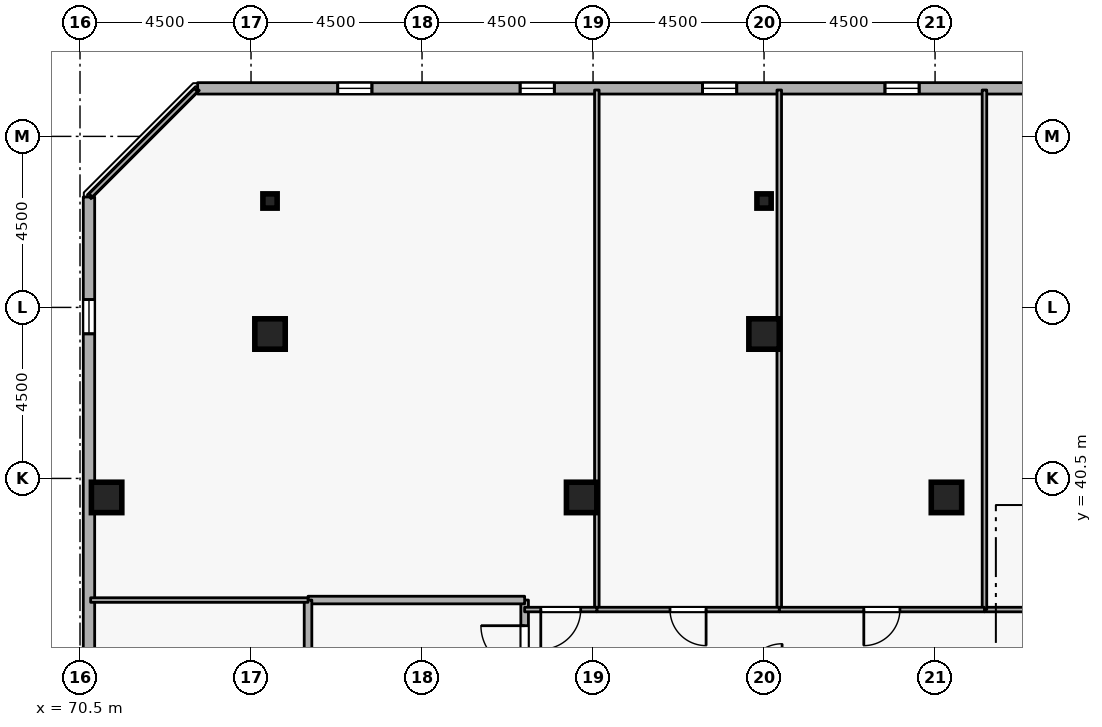
"""IFC4 building model, lengths in metres.
Left out: names, types, materials, properties, quantities, classifications, styles, units other than length and angle.
Written with IfcOpenShell. Run it as: python <this file> out.ifc"""

import sys

from ifc_helpers import new_model, si_unit, direction, frame, frame_2d, origin, origin_2d, place, context, subcontext, project, spatial, rectangle, i_section, extrude, element, fill, save


model = new_model("IFC4")
c1 = context("Model", 3, precision=1e-05, world=origin(), true_north=direction((0.0, 1.0)))
c2 = subcontext(c1, "Body", "Model", "MODEL_VIEW")
j1 = project(units=[si_unit("LENGTHUNIT", "METRE"), si_unit("PLANEANGLEUNIT", "RADIAN")], contexts=[c1])
p1 = place(None, origin())
s1 = spatial("IfcSite", under=j1, at=p1, CompositionType="ELEMENT")
p2 = place(p1, origin())
s2 = spatial("IfcBuilding", under=s1, at=p2, CompositionType="ELEMENT")
p3 = place(p2, frame((0.0, 0.0, 272.7)))
s3 = spatial("IfcBuildingStorey", under=s2, at=p3, CompositionType="ELEMENT", Elevation=272.7)
for number, where, z_axis, x_axis in (
    (1, (88.5, 44.3, 0.0), (0.0, 0.0, 1.0), (1.0, 0.0, 0.0)),
    (2, (75.5, 44.3, 0.0), (0.0, 0.0, 1.0), (1.0, 0.0, 0.0)),
    (3, (71.2, 40.0, 0.0), (0.0, 0.0, 1.0), (1.0, 0.0, 0.0)),
    (4, (93.3, 40.0, 0.0), (0.0, 0.0, 1.0), (1.0, 0.0, 0.0)),
    (5, (83.7, 40.0, 0.0), (0.0, 0.0, 1.0), (1.0, 0.0, 0.0)),
):
    element("IfcColumn", number, at=place(p3, frame(where, z_axis=z_axis, x_axis=x_axis)), inside=s3, PredefinedType="COLUMN", context=c2, shape_type="SweptSolid", body=[
        extrude(rectangle(XDim=0.8, YDim=0.8, at=origin_2d()), origin(), (0.0, 0.0, 1.0), 3.6),
    ])
for number, where, z_axis, x_axis in (
    (6, (88.5, 47.8, 0.0), (0.0, 0.0, 1.0), (1.0, 0.0, 0.0)),
    (7, (75.5, 47.8, 0.0), (0.0, 0.0, 1.0), (1.0, 0.0, 0.0)),
):
    element("IfcColumn", number, at=place(p3, frame(where, z_axis=z_axis, x_axis=x_axis)), inside=s3, PredefinedType="COLUMN", context=c2, shape_type="SweptSolid", body=[
        extrude(i_section(OverallWidth=0.375, OverallDepth=0.375, WebThickness=0.017, FlangeThickness=0.027, FilletRadius=0.015, at=origin_2d()), origin(), (0.0, 0.0, 1.0), 3.6),
    ])
p4 = place(p3, frame((109.681, 50.765, 0.0), z_axis=(0.0, 0.0, 1.0), x_axis=(-0.999999999634, -2.7061402e-05, 0.0)))
e8 = element("IfcWall", 8, at=p4, inside=s3, PredefinedType="STANDARD", context=c2, shape_type="SweptSolid", body=[
    extrude(rectangle(XDim=36.087, YDim=0.3, at=frame_2d((18.043, 0.0))), origin(), (0.0, 0.0, 1.0), 2.7),
])
p5 = place(p4, frame((2.7, 0.0, 0.72)))
e9 = element("IfcOpeningElement", 9, at=p5, cuts=e8, PredefinedType="OPENING", context=c2, shape_type="SweptSolid", body=[
    extrude(rectangle(XDim=0.9, YDim=1.75, at=frame_2d((0.45, 0.875))), frame((0.0, 0.16, 0.0), z_axis=(0.0, -1.0, 0.0), x_axis=(1.0, 0.0, 0.0)), (0.0, 0.0, 1.0), 0.32),
])
p6 = place(p4, frame((7.5, 0.0, 0.72)))
e10 = element("IfcOpeningElement", 10, at=p6, cuts=e8, PredefinedType="OPENING", context=c2, shape_type="SweptSolid", body=[
    extrude(rectangle(XDim=0.9, YDim=1.75, at=frame_2d((0.45, 0.875))), frame((0.0, 0.16, 0.0), z_axis=(0.0, -1.0, 0.0), x_axis=(1.0, 0.0, 0.0)), (0.0, 0.0, 1.0), 0.32),
])
p7 = place(p4, frame((12.3, 0.0, 0.72)))
e11 = element("IfcOpeningElement", 11, at=p7, cuts=e8, PredefinedType="OPENING", context=c2, shape_type="SweptSolid", body=[
    extrude(rectangle(XDim=0.9, YDim=1.75, at=frame_2d((0.45, 0.875))), frame((0.0, 0.16, 0.0), z_axis=(0.0, -1.0, 0.0), x_axis=(1.0, 0.0, 0.0)), (0.0, 0.0, 1.0), 0.32),
])
p8 = place(p4, frame((17.1, 0.0, 0.72)))
e12 = element("IfcOpeningElement", 12, at=p8, cuts=e8, PredefinedType="OPENING", context=c2, shape_type="SweptSolid", body=[
    extrude(rectangle(XDim=0.9, YDim=1.75, at=frame_2d((0.45, 0.875))), frame((0.0, 0.16, 0.0), z_axis=(0.0, -1.0, 0.0), x_axis=(1.0, 0.0, 0.0)), (0.0, 0.0, 1.0), 0.32),
])
p9 = place(p4, frame((21.9, 0.0, 0.72)))
e13 = element("IfcOpeningElement", 13, at=p9, cuts=e8, PredefinedType="OPENING", context=c2, shape_type="SweptSolid", body=[
    extrude(rectangle(XDim=0.9, YDim=1.75, at=frame_2d((0.45, 0.875))), frame((0.0, 0.16, 0.0), z_axis=(0.0, -1.0, 0.0), x_axis=(1.0, 0.0, 0.0)), (0.0, 0.0, 1.0), 0.32),
])
p10 = place(p4, frame((26.7, 0.0, 0.72)))
e14 = element("IfcOpeningElement", 14, at=p10, cuts=e8, PredefinedType="OPENING", context=c2, shape_type="SweptSolid", body=[
    extrude(rectangle(XDim=0.9, YDim=1.75, at=frame_2d((0.45, 0.875))), frame((0.0, 0.16, 0.0), z_axis=(0.0, -1.0, 0.0), x_axis=(1.0, 0.0, 0.0)), (0.0, 0.0, 1.0), 0.32),
])
p11 = place(p4, frame((31.5, 0.0, 0.72)))
e15 = element("IfcOpeningElement", 15, at=p11, cuts=e8, PredefinedType="OPENING", context=c2, shape_type="SweptSolid", body=[
    extrude(rectangle(XDim=0.9, YDim=1.75, at=frame_2d((0.45, 0.875))), frame((0.0, 0.16, 0.0), z_axis=(0.0, -1.0, 0.0), x_axis=(1.0, 0.0, 0.0)), (0.0, 0.0, 1.0), 0.32),
])
p12 = place(p3, frame((70.736, 47.906, 0.0), z_axis=(0.0, 0.0, 1.0), x_axis=(-2.7061402e-05, -0.999999999634, 0.0)))
e16 = element("IfcWall", 16, at=p12, inside=s3, PredefinedType="STANDARD", context=c2, shape_type="SweptSolid", body=[
    extrude(rectangle(XDim=36.087, YDim=0.3, at=frame_2d((18.043, 0.0))), origin(), (0.0, 0.0, 1.0), 2.7),
])
p13 = place(p12, frame((2.7, 0.0, 0.72)))
e17 = element("IfcOpeningElement", 17, at=p13, cuts=e16, PredefinedType="OPENING", context=c2, shape_type="SweptSolid", body=[
    extrude(rectangle(XDim=0.9, YDim=1.75, at=frame_2d((0.45, 0.875))), frame((0.0, 0.16, 0.0), z_axis=(0.0, -1.0, 0.0), x_axis=(1.0, 0.0, 0.0)), (0.0, 0.0, 1.0), 0.32),
])
p14 = place(p12, frame((12.3, 0.0, 0.72)))
e18 = element("IfcOpeningElement", 18, at=p14, cuts=e16, PredefinedType="OPENING", context=c2, shape_type="SweptSolid", body=[
    extrude(rectangle(XDim=0.9, YDim=1.75, at=frame_2d((0.45, 0.875))), frame((0.0, 0.16, 0.0), z_axis=(0.0, -1.0, 0.0), x_axis=(1.0, 0.0, 0.0)), (0.0, 0.0, 1.0), 0.32),
])
p15 = place(p12, frame((17.1, 0.0, 0.72)))
e19 = element("IfcOpeningElement", 19, at=p15, cuts=e16, PredefinedType="OPENING", context=c2, shape_type="SweptSolid", body=[
    extrude(rectangle(XDim=0.9, YDim=1.75, at=frame_2d((0.45, 0.875))), frame((0.0, 0.16, 0.0), z_axis=(0.0, -1.0, 0.0), x_axis=(1.0, 0.0, 0.0)), (0.0, 0.0, 1.0), 0.32),
])
p16 = place(p12, frame((26.7, 0.0, 0.72)))
e20 = element("IfcOpeningElement", 20, at=p16, cuts=e16, PredefinedType="OPENING", context=c2, shape_type="SweptSolid", body=[
    extrude(rectangle(XDim=0.9, YDim=1.75, at=frame_2d((0.45, 0.875))), frame((0.0, 0.16, 0.0), z_axis=(0.0, -1.0, 0.0), x_axis=(1.0, 0.0, 0.0)), (0.0, 0.0, 1.0), 0.32),
])
p17 = place(p12, frame((31.5, 0.0, 0.72)))
e21 = element("IfcOpeningElement", 21, at=p17, cuts=e16, PredefinedType="OPENING", context=c2, shape_type="SweptSolid", body=[
    extrude(rectangle(XDim=0.9, YDim=1.75, at=frame_2d((0.45, 0.875))), frame((0.0, 0.16, 0.0), z_axis=(0.0, -1.0, 0.0), x_axis=(1.0, 0.0, 0.0)), (0.0, 0.0, 1.0), 0.32),
])
p18 = place(p3, frame((82.2, 34.8, 0.0), z_axis=(0.0, 0.0, 1.0), x_axis=(0.0, 1.0, 0.0)))
e22 = element("IfcWall", 22, at=p18, inside=s3, PredefinedType="STANDARD", context=c2, shape_type="SweptSolid", body=[
    extrude(rectangle(XDim=2.5, YDim=0.2, at=frame_2d((1.25, 0.0))), origin(), (0.0, 0.0, 1.0), 3.34),
])
p19 = place(p18, frame((0.675, 0.0, 0.0)))
e23 = element("IfcOpeningElement", 23, at=p19, cuts=e22, PredefinedType="OPENING", context=c2, shape_type="SweptSolid", body=[
    extrude(rectangle(XDim=1.15, YDim=2.1, at=frame_2d((0.575, 1.05))), frame((0.0, 0.11, 0.0), z_axis=(0.0, -1.0, 0.0), x_axis=(1.0, 0.0, 0.0)), (0.0, 0.0, 1.0), 0.22),
])
p20 = place(p3, frame((82.2, 37.3, 0.0), z_axis=(0.0, 0.0, 1.0), x_axis=(-1.0, 0.0, 0.0)))
e24 = element("IfcWall", 24, at=p20, inside=s3, PredefinedType="STANDARD", context=c2, shape_type="SweptSolid", body=[
    extrude(rectangle(XDim=5.7, YDim=0.2, at=frame_2d((2.85, 0.0))), origin(), (0.0, 0.0, 1.0), 3.34),
])
p21 = place(p3, frame((76.5, 37.3, 0.0), z_axis=(0.0, 0.0, 1.0), x_axis=(0.0, -1.0, 0.0)))
e25 = element("IfcWall", 25, at=p21, inside=s3, PredefinedType="STANDARD", context=c2, shape_type="SweptSolid", body=[
    extrude(rectangle(XDim=2.5, YDim=0.2, at=frame_2d((1.25, 0.0))), origin(), (0.0, 0.0, 1.0), 3.34),
])
p22 = place(p3, frame((100.7, 37.05, 0.0), z_axis=(0.0, 0.0, 1.0), x_axis=(-1.0, 0.0, 0.0)))
e26 = element("IfcWall", 26, at=p22, inside=s3, PredefinedType="PARTITIONING", context=c2, shape_type="SweptSolid", body=[
    extrude(rectangle(XDim=6.4, YDim=0.12, at=frame_2d((3.2, 0.0))), origin(), (0.0, 0.0, 1.0), 3.34),
])
p23 = place(p22, frame((2.675, 0.0, 0.0)))
e27 = element("IfcOpeningElement", 27, at=p23, cuts=e26, PredefinedType="OPENING", context=c2, shape_type="SweptSolid", body=[
    extrude(rectangle(XDim=1.05, YDim=2.1, at=frame_2d((0.525, 1.05))), frame((0.0, 0.07, 0.0), z_axis=(0.0, -1.0, 0.0), x_axis=(1.0, 0.0, 0.0)), (0.0, 0.0, 1.0), 0.14),
])
for number, where, z_axis, x_axis in (
    (28, (94.3, 37.05, 0.0), (0.0, 0.0, 1.0), (0.0, 1.0, 0.0)),
    (29, (88.9, 37.05, 0.0), (0.0, 0.0, 1.0), (0.0, 1.0, 0.0)),
):
    element("IfcWall", number, at=place(p3, frame(where, z_axis=z_axis, x_axis=x_axis)), inside=s3, PredefinedType="PARTITIONING", context=c2, shape_type="SweptSolid", body=[
        extrude(rectangle(XDim=13.67, YDim=0.12, at=frame_2d((6.835, 0.0))), origin(), (0.0, 0.0, 1.0), 3.34),
    ])
p24 = place(p3, frame((94.3, 37.05, 0.0), z_axis=(0.0, 0.0, 1.0), x_axis=(-1.0, 0.0, 0.0)))
e30 = element("IfcWall", 30, at=p24, inside=s3, PredefinedType="PARTITIONING", context=c2, shape_type="SweptSolid", body=[
    extrude(rectangle(XDim=5.4, YDim=0.12, at=frame_2d((2.7, 0.0))), origin(), (0.0, 0.0, 1.0), 3.34),
])
p25 = place(p24, frame((2.225, 0.0, 0.0)))
e31 = element("IfcOpeningElement", 31, at=p25, cuts=e30, PredefinedType="OPENING", context=c2, shape_type="SweptSolid", body=[
    extrude(rectangle(XDim=0.95, YDim=2.1, at=frame_2d((0.475, 1.05))), frame((0.0, 0.07, 0.0), z_axis=(0.0, -1.0, 0.0), x_axis=(1.0, 0.0, 0.0)), (0.0, 0.0, 1.0), 0.14),
])
p26 = place(p3, frame((84.1, 37.05, 0.0), z_axis=(0.0, 0.0, 1.0), x_axis=(0.0, 1.0, 0.0)))
e32 = element("IfcWall", 32, at=p26, inside=s3, PredefinedType="PARTITIONING", context=c2, shape_type="SweptSolid", body=[
    extrude(rectangle(XDim=13.67, YDim=0.12, at=frame_2d((6.835, 0.0))), origin(), (0.0, 0.0, 1.0), 3.34),
])
p27 = place(p3, frame((88.9, 37.05, 0.0), z_axis=(0.0, 0.0, 1.0), x_axis=(-1.0, 0.0, 0.0)))
e33 = element("IfcWall", 33, at=p27, inside=s3, PredefinedType="PARTITIONING", context=c2, shape_type="SweptSolid", body=[
    extrude(rectangle(XDim=4.8, YDim=0.12, at=frame_2d((2.4, 0.0))), origin(), (0.0, 0.0, 1.0), 3.34),
])
p28 = place(p27, frame((1.925, 0.0, 0.0)))
e34 = element("IfcOpeningElement", 34, at=p28, cuts=e33, PredefinedType="OPENING", context=c2, shape_type="SweptSolid", body=[
    extrude(rectangle(XDim=0.95, YDim=2.1, at=frame_2d((0.475, 1.05))), frame((0.0, 0.07, 0.0), z_axis=(0.0, -1.0, 0.0), x_axis=(1.0, 0.0, 0.0)), (0.0, 0.0, 1.0), 0.14),
])
p29 = place(p3, frame((76.5, 37.3, 0.0), z_axis=(0.0, 0.0, 1.0), x_axis=(-1.0, 0.0, 0.0)))
e35 = element("IfcWall", 35, at=p29, inside=s3, PredefinedType="PARTITIONING", context=c2, shape_type="SweptSolid", body=[
    extrude(rectangle(XDim=5.72, YDim=0.12, at=frame_2d((2.86, 0.0))), origin(), (0.0, 0.0, 1.0), 3.34),
])
p30 = place(p3, frame((70.78, 47.948, 0.0), z_axis=(0.0, 0.0, 1.0), x_axis=(0.707106781187, 0.707106781187, 0.0)))
e36 = element("IfcWall", 36, at=p30, inside=s3, PredefinedType="PARTITIONING", context=c2, shape_type="SweptSolid", body=[
    extrude(rectangle(XDim=3.919, YDim=0.12, at=frame_2d((1.96, 0.0))), origin(), (0.0, 0.0, 1.0), 3.34),
])
p31 = place(p3, frame((84.1, 37.05, 0.0), z_axis=(0.0, 0.0, 1.0), x_axis=(-1.0, 0.0, 0.0)))
e37 = element("IfcWall", 37, at=p31, inside=s3, PredefinedType="PARTITIONING", context=c2, shape_type="SweptSolid", body=[
    extrude(rectangle(XDim=1.9, YDim=0.12, at=frame_2d((0.95, 0.0))), origin(), (0.0, 0.0, 1.0), 3.34),
])
p32 = place(p31, frame((0.425, 0.0, 0.0)))
e38 = element("IfcOpeningElement", 38, at=p32, cuts=e37, PredefinedType="OPENING", context=c2, shape_type="SweptSolid", body=[
    extrude(rectangle(XDim=1.05, YDim=2.1, at=frame_2d((0.525, 1.05))), frame((0.0, 0.07, 0.0), z_axis=(0.0, -1.0, 0.0), x_axis=(1.0, 0.0, 0.0)), (0.0, 0.0, 1.0), 0.14),
])
p33 = place(p8, origin())
e39 = element("IfcWindow", 39, at=p33, inside=s3, PartitioningType="SINGLE_PANEL", PredefinedType="WINDOW", context=c2, shape_type="SweptSolid", body=[
    extrude(rectangle(XDim=0.9, YDim=1.75, at=frame_2d((0.45, 0.875))), frame((0.0, 0.03, 0.0), z_axis=(0.0, -1.0, 0.0), x_axis=(1.0, 0.0, 0.0)), (0.0, 0.0, 1.0), 0.06),
])
fill(e12, e39)
p34 = place(p9, origin())
e40 = element("IfcWindow", 40, at=p34, inside=s3, PartitioningType="SINGLE_PANEL", PredefinedType="WINDOW", context=c2, shape_type="SweptSolid", body=[
    extrude(rectangle(XDim=0.9, YDim=1.75, at=frame_2d((0.45, 0.875))), frame((0.0, 0.03, 0.0), z_axis=(0.0, -1.0, 0.0), x_axis=(1.0, 0.0, 0.0)), (0.0, 0.0, 1.0), 0.06),
])
fill(e13, e40)
p35 = place(p10, origin())
e41 = element("IfcWindow", 41, at=p35, inside=s3, PartitioningType="SINGLE_PANEL", PredefinedType="WINDOW", context=c2, shape_type="SweptSolid", body=[
    extrude(rectangle(XDim=0.9, YDim=1.75, at=frame_2d((0.45, 0.875))), frame((0.0, 0.03, 0.0), z_axis=(0.0, -1.0, 0.0), x_axis=(1.0, 0.0, 0.0)), (0.0, 0.0, 1.0), 0.06),
])
fill(e14, e41)
p36 = place(p11, origin())
e42 = element("IfcWindow", 42, at=p36, inside=s3, PartitioningType="SINGLE_PANEL", PredefinedType="WINDOW", context=c2, shape_type="SweptSolid", body=[
    extrude(rectangle(XDim=0.9, YDim=1.75, at=frame_2d((0.45, 0.875))), frame((0.0, 0.03, 0.0), z_axis=(0.0, -1.0, 0.0), x_axis=(1.0, 0.0, 0.0)), (0.0, 0.0, 1.0), 0.06),
])
fill(e15, e42)
p37 = place(p13, origin())
e43 = element("IfcWindow", 43, at=p37, inside=s3, PartitioningType="SINGLE_PANEL", PredefinedType="WINDOW", context=c2, shape_type="SweptSolid", body=[
    extrude(rectangle(XDim=0.9, YDim=1.75, at=frame_2d((0.45, 0.875))), frame((0.0, 0.03, 0.0), z_axis=(0.0, -1.0, 0.0), x_axis=(1.0, 0.0, 0.0)), (0.0, 0.0, 1.0), 0.06),
])
fill(e17, e43)
p38 = place(p19, origin())
e44 = element("IfcDoor", 44, at=p38, inside=s3, OperationType="SINGLE_SWING_RIGHT", PredefinedType="DOOR", context=c2, shape_type="SweptSolid", body=[
    extrude(rectangle(XDim=1.15, YDim=2.1, at=frame_2d((0.575, 1.05))), frame((0.0, 0.025, 0.0), z_axis=(0.0, -1.0, 0.0), x_axis=(1.0, 0.0, 0.0)), (0.0, 0.0, 1.0), 0.05),
])
fill(e23, e44)
p39 = place(p25, origin())
e45 = element("IfcDoor", 45, at=p39, inside=s3, OperationType="SINGLE_SWING_RIGHT", PredefinedType="DOOR", context=c2, shape_type="SweptSolid", body=[
    extrude(rectangle(XDim=0.95, YDim=2.1, at=frame_2d((0.475, 1.05))), frame((0.0, 0.025, 0.0), z_axis=(0.0, -1.0, 0.0), x_axis=(1.0, 0.0, 0.0)), (0.0, 0.0, 1.0), 0.05),
])
fill(e31, e45)
p40 = place(p28, origin())
e46 = element("IfcDoor", 46, at=p40, inside=s3, OperationType="SINGLE_SWING_LEFT", PredefinedType="DOOR", context=c2, shape_type="SweptSolid", body=[
    extrude(rectangle(XDim=0.95, YDim=2.1, at=frame_2d((0.475, 1.05))), frame((0.0, 0.025, 0.0), z_axis=(0.0, -1.0, 0.0), x_axis=(1.0, 0.0, 0.0)), (0.0, 0.0, 1.0), 0.05),
])
fill(e34, e46)
p41 = place(p32, origin())
e47 = element("IfcDoor", 47, at=p41, inside=s3, OperationType="SINGLE_SWING_RIGHT", PredefinedType="DOOR", context=c2, shape_type="SweptSolid", body=[
    extrude(rectangle(XDim=1.05, YDim=2.1, at=frame_2d((0.525, 1.05))), frame((0.0, 0.025, 0.0), z_axis=(0.0, -1.0, 0.0), x_axis=(1.0, 0.0, 0.0)), (0.0, 0.0, 1.0), 0.05),
])
fill(e38, e47)
save(model, sys.argv[1])
